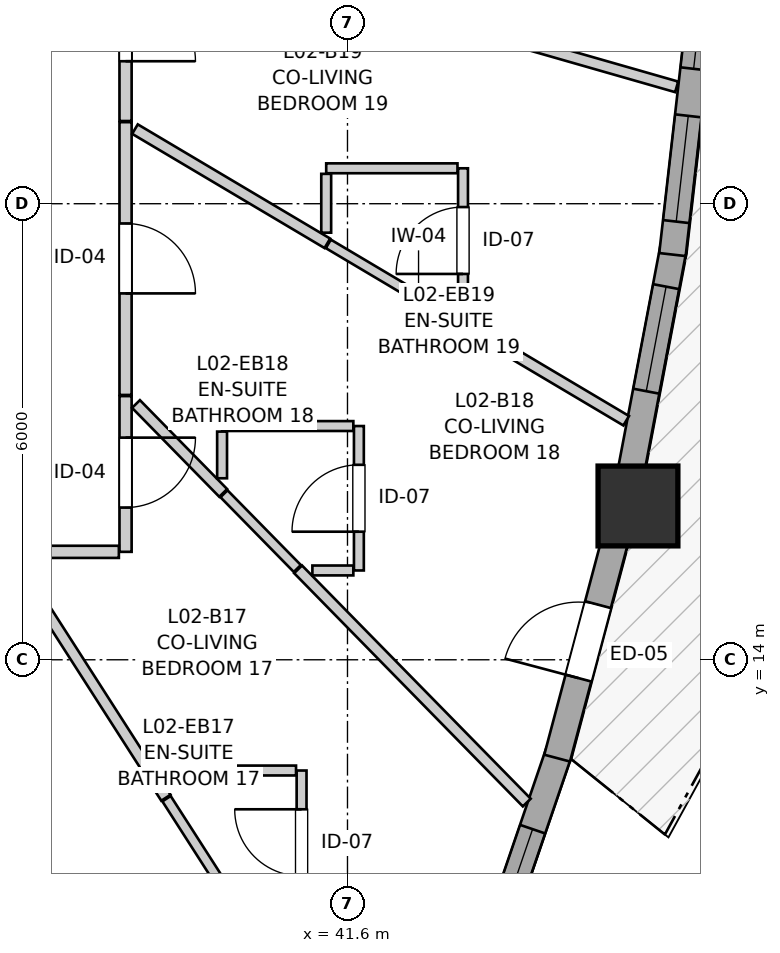
"""IFC4 building model, lengths in metres.
Left out: names, types, materials, properties, quantities, classifications, styles, units other than length and angle.
Written with IfcOpenShell. Run it as: python <this file> out.ifc"""

import sys

from ifc_helpers import new_model, si_unit, direction, frame, frame_2d, origin, origin_2d, place, context, subcontext, project, spatial, rectangle, extrude, source, transform, mapped, element, fill, save


model = new_model("IFC4")
c1 = context("Model", 3, precision=1e-05, world=origin(), true_north=direction((0.0, 1.0)))
c2 = subcontext(c1, "Body", "Model", "MODEL_VIEW")
j1 = project(units=[si_unit("LENGTHUNIT", "METRE"), si_unit("PLANEANGLEUNIT", "RADIAN")], contexts=[c1])
p1 = place(None, origin())
s1 = spatial("IfcSite", under=j1, at=p1, CompositionType="ELEMENT")
p2 = place(p1, origin())
s2 = spatial("IfcBuilding", under=s1, at=p2, CompositionType="ELEMENT")
p3 = place(p2, frame((0.0, 0.0, 11.0)))
s3 = spatial("IfcBuildingStorey", under=s2, at=p3, CompositionType="ELEMENT", Elevation=11.0)
m1 = source(origin(), c2, "Body", "SweptSolid", [
    extrude(rectangle(XDim=1.05, YDim=1.05, at=origin_2d()), origin(), (0.0, 0.0, 1.0), 2.94),
])
p4 = place(p3, frame((45.422, 16.023, 0.0), z_axis=(0.0, 0.0, 1.0), x_axis=(1.0, 0.0, 0.0)))
e1 = element("IfcColumn", 1, at=p4, inside=s3, PredefinedType="COLUMN", context=c2, shape_type="MappedRepresentation", body=[
    mapped(m1, transform((0.0, 0.0, 0.0), x_axis=(1.0, 0.0, 0.0), y_axis=(0.0, 1.0, 0.0), z_axis=(0.0, 0.0, 1.0), scale=1.0)),
])
p5 = place(p3, frame((43.241, 9.448, 0.0), z_axis=(0.0, 0.0, 1.0), x_axis=(0.323599751171, 0.946194060984, 0.0)))
e2 = element("IfcWall", 2, at=p5, inside=s3, PredefinedType="SOLIDWALL", context=c2, shape_type="SweptSolid", body=[
    extrude(rectangle(XDim=3.532, YDim=0.35, at=frame_2d((1.766, 0.0))), origin(), (0.0, 0.0, 1.0), 2.42),
])
p6 = place(p5, frame((0.356, 0.0, 0.82)))
e3 = element("IfcOpeningElement", 3, at=p6, cuts=e2, PredefinedType="OPENING", context=c2, shape_type="SweptSolid", body=[
    extrude(rectangle(XDim=2.1, YDim=1.4, at=frame_2d((1.05, 0.7))), frame((0.0, 0.185, 0.0), z_axis=(0.0, -1.0, 0.0), x_axis=(1.0, 0.0, 0.0)), (0.0, 0.0, 1.0), 0.37),
])
p7 = place(p3, frame((44.358, 12.706, 0.0), z_axis=(0.0, 0.0, 1.0), x_axis=(0.25708907847, 0.966387709841, 0.0)))
e4 = element("IfcWall", 4, at=p7, inside=s3, PredefinedType="SOLIDWALL", context=c2, shape_type="SweptSolid", body=[
    extrude(rectangle(XDim=3.179, YDim=0.35, at=frame_2d((1.59, 0.0))), origin(), (0.0, 0.0, 1.0), 2.42),
])
p8 = place(p7, frame((1.09, 0.0, 0.0)))
e5 = element("IfcOpeningElement", 5, at=p8, cuts=e4, PredefinedType="OPENING", context=c2, shape_type="SweptSolid", body=[
    extrude(rectangle(XDim=1.0, YDim=2.1, at=frame_2d((0.5, 1.05))), frame((0.0, 0.185, 0.0), z_axis=(0.0, -1.0, 0.0), x_axis=(1.0, 0.0, 0.0)), (0.0, 0.0, 1.0), 0.37),
])
p9 = place(p3, frame((45.306, 16.351, 0.0), z_axis=(0.0, 0.0, 1.0), x_axis=(0.186681017514, 0.982420580861, 0.0)))
e6 = element("IfcWall", 6, at=p9, inside=s3, PredefinedType="SOLIDWALL", context=c2, shape_type="SweptSolid", body=[
    extrude(rectangle(XDim=3.123, YDim=0.35, at=frame_2d((1.562, 0.0))), origin(), (0.0, 0.0, 1.0), 2.42),
])
p10 = place(p9, frame((1.204, 0.0, 0.82)))
e7 = element("IfcOpeningElement", 7, at=p10, cuts=e6, PredefinedType="OPENING", context=c2, shape_type="SweptSolid", body=[
    extrude(rectangle(XDim=1.4, YDim=1.35, at=frame_2d((0.7, 0.675))), frame((0.0, 0.185, 0.0), z_axis=(0.0, -1.0, 0.0), x_axis=(1.0, 0.0, 0.0)), (0.0, 0.0, 1.0), 0.37),
])
p11 = place(p3, frame((45.875, 19.331, 0.0), z_axis=(0.0, 0.0, 1.0), x_axis=(0.113329685842, 0.99355743785, 0.0)))
e8 = element("IfcWall", 8, at=p11, inside=s3, PredefinedType="SOLIDWALL", context=c2, shape_type="SweptSolid", body=[
    extrude(rectangle(XDim=3.365, YDim=0.35, at=frame_2d((1.683, 0.0))), origin(), (0.0, 0.0, 1.0), 2.42),
])
p12 = place(p11, frame((0.437, 0.0, 0.82)))
e9 = element("IfcOpeningElement", 9, at=p12, cuts=e8, PredefinedType="OPENING", context=c2, shape_type="SweptSolid", body=[
    extrude(rectangle(XDim=1.4, YDim=1.35, at=frame_2d((0.7, 0.675))), frame((0.0, 0.185, 0.0), z_axis=(0.0, -1.0, 0.0), x_axis=(1.0, 0.0, 0.0)), (0.0, 0.0, 1.0), 0.37),
])
p13 = place(p11, frame((2.459, 0.0, 0.82)))
e10 = element("IfcOpeningElement", 10, at=p13, cuts=e8, PredefinedType="OPENING", context=c2, shape_type="SweptSolid", body=[
    extrude(rectangle(XDim=0.58, YDim=1.35, at=frame_2d((0.29, 0.675))), frame((0.0, 0.185, 0.0), z_axis=(0.0, -1.0, 0.0), x_axis=(1.0, 0.0, 0.0)), (0.0, 0.0, 1.0), 0.37),
])
p14 = place(p3, frame((38.68, 21.073, 0.0), z_axis=(0.0, 0.0, 1.0), x_axis=(0.0, -1.0, 0.0)))
e11 = element("IfcWall", 11, at=p14, inside=s3, PredefinedType="PARTITIONING", context=c2, shape_type="SweptSolid", body=[
    extrude(rectangle(XDim=3.589, YDim=0.16, at=frame_2d((1.794, 0.0))), origin(), (0.0, 0.0, 1.0), 2.94),
])
p15 = place(p14, frame((1.333, 0.0, 0.0)))
e12 = element("IfcOpeningElement", 12, at=p15, cuts=e11, PredefinedType="OPENING", context=c2, shape_type="SweptSolid", body=[
    extrude(rectangle(XDim=0.92, YDim=2.1, at=frame_2d((0.46, 1.05))), frame((0.0, 0.09, 0.0), z_axis=(0.0, -1.0, 0.0), x_axis=(1.0, 0.0, 0.0)), (0.0, 0.0, 1.0), 0.18),
])
p16 = place(p3, frame((38.68, 23.63, 0.0), z_axis=(0.0, 0.0, 1.0), x_axis=(0.0, -1.0, 0.0)))
e13 = element("IfcWall", 13, at=p16, inside=s3, PredefinedType="PARTITIONING", context=c2, shape_type="SweptSolid", body=[
    extrude(rectangle(XDim=2.542, YDim=0.16, at=frame_2d((1.271, 0.0))), origin(), (0.0, 0.0, 1.0), 2.94),
])
p17 = place(p16, frame((0.835, 0.0, 0.0)))
e14 = element("IfcOpeningElement", 14, at=p17, cuts=e13, PredefinedType="OPENING", context=c2, shape_type="SweptSolid", body=[
    extrude(rectangle(XDim=0.92, YDim=2.1, at=frame_2d((0.46, 1.05))), frame((0.0, 0.09, 0.0), z_axis=(0.0, -1.0, 0.0), x_axis=(1.0, 0.0, 0.0)), (0.0, 0.0, 1.0), 0.18),
])
p18 = place(p3, frame((38.68, 17.469, 0.0), z_axis=(0.0, 0.0, 1.0), x_axis=(0.0, -1.0, 0.0)))
e15 = element("IfcWall", 15, at=p18, inside=s3, PredefinedType="PARTITIONING", context=c2, shape_type="SweptSolid", body=[
    extrude(rectangle(XDim=2.049, YDim=0.16, at=frame_2d((1.024, 0.0))), origin(), (0.0, 0.0, 1.0), 2.94),
])
p19 = place(p18, frame((0.546, 0.0, 0.0)))
e16 = element("IfcOpeningElement", 16, at=p19, cuts=e15, PredefinedType="OPENING", context=c2, shape_type="SweptSolid", body=[
    extrude(rectangle(XDim=0.92, YDim=2.1, at=frame_2d((0.46, 1.05))), frame((0.0, 0.09, 0.0), z_axis=(0.0, -1.0, 0.0), x_axis=(1.0, 0.0, 0.0)), (0.0, 0.0, 1.0), 0.18),
])
p20 = place(p3, frame((43.12, 18.566, 0.0), z_axis=(0.0, 0.0, 1.0), x_axis=(0.0, 1.0, 0.0)))
e17 = element("IfcWall", 17, at=p20, inside=s3, PredefinedType="PARTITIONING", context=c2, shape_type="SweptSolid", body=[
    extrude(rectangle(XDim=1.9, YDim=0.13, at=frame_2d((0.95, 0.0))), origin(), (0.0, 0.0, 1.0), 2.94),
])
p21 = place(p20, frame((0.51, 0.0, 0.0)))
e18 = element("IfcOpeningElement", 18, at=p21, cuts=e17, PredefinedType="OPENING", context=c2, shape_type="SweptSolid", body=[
    extrude(rectangle(XDim=0.88, YDim=2.05, at=frame_2d((0.44, 1.025))), frame((0.0, 0.075, 0.0), z_axis=(0.0, -1.0, 0.0), x_axis=(1.0, 0.0, 0.0)), (0.0, 0.0, 1.0), 0.15),
])
p22 = place(p3, frame((40.996, 10.643, 0.0), z_axis=(0.0, 0.0, 1.0), x_axis=(0.0, 1.0, 0.0)))
e19 = element("IfcWall", 19, at=p22, inside=s3, PredefinedType="PARTITIONING", context=c2, shape_type="SweptSolid", body=[
    extrude(rectangle(XDim=1.9, YDim=0.13, at=frame_2d((0.95, 0.0))), origin(), (0.0, 0.0, 1.0), 2.94),
])
p23 = place(p22, frame((0.51, 0.0, 0.0)))
e20 = element("IfcOpeningElement", 20, at=p23, cuts=e19, PredefinedType="OPENING", context=c2, shape_type="SweptSolid", body=[
    extrude(rectangle(XDim=0.88, YDim=2.05, at=frame_2d((0.44, 1.025))), frame((0.0, 0.075, 0.0), z_axis=(0.0, -1.0, 0.0), x_axis=(1.0, 0.0, 0.0)), (0.0, 0.0, 1.0), 0.15),
])
p24 = place(p3, frame((41.75, 15.175, 0.0), z_axis=(0.0, 0.0, 1.0), x_axis=(0.0, 1.0, 0.0)))
e21 = element("IfcWall", 21, at=p24, inside=s3, PredefinedType="PARTITIONING", context=c2, shape_type="SweptSolid", body=[
    extrude(rectangle(XDim=1.9, YDim=0.13, at=frame_2d((0.95, 0.0))), origin(), (0.0, 0.0, 1.0), 2.94),
])
p25 = place(p24, frame((0.51, 0.0, 0.0)))
e22 = element("IfcOpeningElement", 22, at=p25, cuts=e21, PredefinedType="OPENING", context=c2, shape_type="SweptSolid", body=[
    extrude(rectangle(XDim=0.88, YDim=2.05, at=frame_2d((0.44, 1.025))), frame((0.0, 0.075, 0.0), z_axis=(0.0, -1.0, 0.0), x_axis=(1.0, 0.0, 0.0)), (0.0, 0.0, 1.0), 0.15),
])
p26 = place(p3, frame((40.95, 15.19, 0.0), z_axis=(0.0, 0.0, 1.0), x_axis=(0.700142401903, -0.714003233226, 0.0)))
e23 = element("IfcWall", 23, at=p26, inside=s3, PredefinedType="PARTITIONING", context=c2, shape_type="SweptSolid", body=[
    extrude(rectangle(XDim=4.298, YDim=0.145, at=frame_2d((2.149, 0.0))), origin(), (0.0, 0.0, 1.0), 2.94),
])
p27 = place(p3, frame((37.217, 15.294, 0.0), z_axis=(0.0, 0.0, 1.0), x_axis=(0.539878709929, -0.841742822105, 0.0)))
e24 = element("IfcWall", 24, at=p27, inside=s3, PredefinedType="PARTITIONING", context=c2, shape_type="SweptSolid", body=[
    extrude(rectangle(XDim=3.694, YDim=0.145, at=frame_2d((1.847, 0.0))), origin(), (0.0, 0.0, 1.0), 2.94),
])
p28 = place(p3, frame((38.804, 20.981, 0.0), z_axis=(0.0, 0.0, 1.0), x_axis=(0.859905944731, -0.510452511225, 0.0)))
e25 = element("IfcWall", 25, at=p28, inside=s3, PredefinedType="PARTITIONING", context=c2, shape_type="SweptSolid", body=[
    extrude(rectangle(XDim=2.943, YDim=0.145, at=frame_2d((1.472, 0.0))), origin(), (0.0, 0.0, 1.0), 2.94),
])
p29 = place(p3, frame((43.055, 22.361, 0.0), z_axis=(0.0, 0.0, 1.0), x_axis=(0.961351316588, -0.275324619486, 0.0)))
e26 = element("IfcWall", 26, at=p29, inside=s3, PredefinedType="PARTITIONING", context=c2, shape_type="SweptSolid", body=[
    extrude(rectangle(XDim=2.992, YDim=0.145, at=frame_2d((1.496, 0.0))), origin(), (0.0, 0.0, 1.0), 2.94),
])
p30 = place(p3, frame((42.848, 18.581, 0.0), z_axis=(0.0, 0.0, 1.0), x_axis=(0.859872599939, -0.510508679528, 0.0)))
e27 = element("IfcWall", 27, at=p30, inside=s3, PredefinedType="PARTITIONING", context=c2, shape_type="SweptSolid", body=[
    extrude(rectangle(XDim=2.813, YDim=0.145, at=frame_2d((1.407, 0.0))), origin(), (0.0, 0.0, 1.0), 2.94),
])
p31 = place(p3, frame((38.817, 17.365, 0.0), z_axis=(0.0, 0.0, 1.0), x_axis=(0.70029627305, -0.713852316626, 0.0)))
e28 = element("IfcWall", 28, at=p31, inside=s3, PredefinedType="PARTITIONING", context=c2, shape_type="SweptSolid", body=[
    extrude(rectangle(XDim=1.639, YDim=0.145, at=frame_2d((0.819, 0.0))), origin(), (0.0, 0.0, 1.0), 2.94),
])
for number, where, z_axis, x_axis in (
    (29, (39.196, 12.543, 0.0), (0.0, 0.0, 1.0), (1.0, 0.0, 0.0)),
    (30, (39.95, 17.075, 0.0), (0.0, 0.0, 1.0), (1.0, 0.0, 0.0)),
    (31, (41.32, 20.466, 0.0), (0.0, 0.0, 1.0), (1.0, 0.0, 0.0)),
):
    element("IfcWall", number, at=place(p3, frame(where, z_axis=z_axis, x_axis=x_axis)), inside=s3, PredefinedType="PARTITIONING", context=c2, shape_type="SweptSolid", body=[
        extrude(rectangle(XDim=1.727, YDim=0.13, at=frame_2d((0.864, 0.0))), origin(), (0.0, 0.0, 1.0), 2.94),
    ])
p32 = place(p3, frame((39.219, 12.172, 0.0), z_axis=(0.0, 0.0, 1.0), x_axis=(0.539899826285, -0.84172927808, 0.0)))
e32 = element("IfcWall", 32, at=p32, inside=s3, PredefinedType="PARTITIONING", context=c2, shape_type="SweptSolid", body=[
    extrude(rectangle(XDim=1.784, YDim=0.13, at=frame_2d((0.892, 0.0))), origin(), (0.0, 0.0, 1.0), 2.94),
])
p33 = place(p3, frame((41.348, 19.471, 0.0), z_axis=(0.0, 0.0, 1.0), x_axis=(0.859825694404, -0.510587676352, 0.0)))
e33 = element("IfcWall", 33, at=p33, inside=s3, PredefinedType="PARTITIONING", context=c2, shape_type="SweptSolid", body=[
    extrude(rectangle(XDim=1.729, YDim=0.13, at=frame_2d((0.865, 0.0))), origin(), (0.0, 0.0, 1.0), 2.94),
])
p34 = place(p3, frame((37.314, 15.42, 0.0), z_axis=(0.0, 0.0, 1.0), x_axis=(1.0, 0.0, 0.0)))
e34 = element("IfcWall", 34, at=p34, inside=s3, PredefinedType="PARTITIONING", context=c2, shape_type="SweptSolid", body=[
    extrude(rectangle(XDim=1.278, YDim=0.16, at=frame_2d((0.639, 0.0))), origin(), (0.0, 0.0, 1.0), 2.94),
])
p35 = place(p3, frame((39.975, 16.184, 0.0), z_axis=(0.0, 0.0, 1.0), x_axis=(0.700338966049, -0.713810431861, 0.0)))
e35 = element("IfcWall", 35, at=p35, inside=s3, PredefinedType="PARTITIONING", context=c2, shape_type="SweptSolid", body=[
    extrude(rectangle(XDim=1.377, YDim=0.13, at=frame_2d((0.689, 0.0))), origin(), (0.0, 0.0, 1.0), 2.94),
])
p36 = place(p3, frame((41.32, 19.619, 0.0), z_axis=(0.0, 0.0, 1.0), x_axis=(0.0, 1.0, 0.0)))
e36 = element("IfcWall", 36, at=p36, inside=s3, PredefinedType="PARTITIONING", context=c2, shape_type="SweptSolid", body=[
    extrude(rectangle(XDim=0.774, YDim=0.13, at=frame_2d((0.387, 0.0))), origin(), (0.0, 0.0, 1.0), 2.94),
])
p37 = place(p3, frame((39.95, 16.388, 0.0), z_axis=(0.0, 0.0, 1.0), x_axis=(0.0, 1.0, 0.0)))
e37 = element("IfcWall", 37, at=p37, inside=s3, PredefinedType="PARTITIONING", context=c2, shape_type="SweptSolid", body=[
    extrude(rectangle(XDim=0.614, YDim=0.13, at=frame_2d((0.307, 0.0))), origin(), (0.0, 0.0, 1.0), 2.94),
])
p38 = place(p3, frame((41.138, 15.175, 0.0), z_axis=(0.0, 0.0, 1.0), x_axis=(1.0, 0.0, 0.0)))
e38 = element("IfcWall", 38, at=p38, inside=s3, PredefinedType="PARTITIONING", context=c2, shape_type="SweptSolid", body=[
    extrude(rectangle(XDim=0.539, YDim=0.13, at=frame_2d((0.27, 0.0))), origin(), (0.0, 0.0, 1.0), 2.94),
])
m2 = source(origin(), c2, "Body", "SweptSolid", [
    extrude(rectangle(XDim=2.1, YDim=1.4, at=frame_2d((1.05, 0.7))), frame((0.0, 0.03, 0.0), z_axis=(0.0, -1.0, 0.0), x_axis=(1.0, 0.0, 0.0)), (0.0, 0.0, 1.0), 0.06),
])
p39 = place(p6, origin())
e39 = element("IfcWindow", 39, at=p39, inside=s3, PartitioningType="SINGLE_PANEL", PredefinedType="WINDOW", context=c2, shape_type="MappedRepresentation", body=[
    mapped(m2, transform((0.0, 0.0, 0.0), x_axis=(1.0, 0.0, 0.0), y_axis=(0.0, 1.0, 0.0), z_axis=(0.0, 0.0, 1.0), scale=1.0)),
])
fill(e3, e39)
m3 = source(origin(), c2, "Body", "SweptSolid", [
    extrude(rectangle(XDim=1.4, YDim=1.35, at=frame_2d((0.7, 0.675))), frame((0.0, 0.03, 0.0), z_axis=(0.0, -1.0, 0.0), x_axis=(1.0, 0.0, 0.0)), (0.0, 0.0, 1.0), 0.06),
])
p40 = place(p10, origin())
e40 = element("IfcWindow", 40, at=p40, inside=s3, PartitioningType="SINGLE_PANEL", PredefinedType="WINDOW", context=c2, shape_type="MappedRepresentation", body=[
    mapped(m3, transform((0.0, 0.0, 0.0), x_axis=(1.0, 0.0, 0.0), y_axis=(0.0, 1.0, 0.0), z_axis=(0.0, 0.0, 1.0), scale=1.0)),
])
fill(e7, e40)
p41 = place(p12, origin())
e41 = element("IfcWindow", 41, at=p41, inside=s3, PartitioningType="SINGLE_PANEL", PredefinedType="WINDOW", context=c2, shape_type="MappedRepresentation", body=[
    mapped(m3, transform((0.0, 0.0, 0.0), x_axis=(1.0, 0.0, 0.0), y_axis=(0.0, 1.0, 0.0), z_axis=(0.0, 0.0, 1.0), scale=1.0)),
])
fill(e9, e41)
m4 = source(origin(), c2, "Body", "SweptSolid", [
    extrude(rectangle(XDim=0.58, YDim=1.35, at=frame_2d((0.29, 0.675))), frame((0.0, 0.03, 0.0), z_axis=(0.0, -1.0, 0.0), x_axis=(1.0, 0.0, 0.0)), (0.0, 0.0, 1.0), 0.06),
])
p42 = place(p13, origin())
e42 = element("IfcWindow", 42, at=p42, inside=s3, PartitioningType="SINGLE_PANEL", PredefinedType="WINDOW", context=c2, shape_type="MappedRepresentation", body=[
    mapped(m4, transform((0.0, 0.0, 0.0), x_axis=(1.0, 0.0, 0.0), y_axis=(0.0, 1.0, 0.0), z_axis=(0.0, 0.0, 1.0), scale=1.0)),
])
fill(e10, e42)
m5 = source(origin(), c2, "Body", "SweptSolid", [
    extrude(rectangle(XDim=1.0, YDim=2.1, at=frame_2d((0.5, 1.05))), frame((0.0, 0.025, 0.0), z_axis=(0.0, -1.0, 0.0), x_axis=(1.0, 0.0, 0.0)), (0.0, 0.0, 1.0), 0.05),
])
p43 = place(p8, origin())
e43 = element("IfcDoor", 43, at=p43, inside=s3, OperationType="SINGLE_SWING_LEFT", PredefinedType="DOOR", context=c2, shape_type="MappedRepresentation", body=[
    mapped(m5, transform((0.0, 0.0, 0.0), x_axis=(1.0, 0.0, 0.0), y_axis=(0.0, 1.0, 0.0), z_axis=(0.0, 0.0, 1.0), scale=1.0)),
])
fill(e5, e43)
m6 = source(origin(), c2, "Body", "SweptSolid", [
    extrude(rectangle(XDim=0.92, YDim=2.1, at=frame_2d((0.46, 1.05))), frame((0.0, 0.025, 0.0), z_axis=(0.0, -1.0, 0.0), x_axis=(1.0, 0.0, 0.0)), (0.0, 0.0, 1.0), 0.05),
])
p44 = place(p15, origin())
e44 = element("IfcDoor", 44, at=p44, inside=s3, OperationType="SINGLE_SWING_RIGHT", PredefinedType="DOOR", context=c2, shape_type="MappedRepresentation", body=[
    mapped(m6, transform((0.0, 0.0, 0.0), x_axis=(1.0, 0.0, 0.0), y_axis=(0.0, 1.0, 0.0), z_axis=(0.0, 0.0, 1.0), scale=1.0)),
])
fill(e12, e44)
p45 = place(p17, origin())
e45 = element("IfcDoor", 45, at=p45, inside=s3, OperationType="SINGLE_SWING_RIGHT", PredefinedType="DOOR", context=c2, shape_type="MappedRepresentation", body=[
    mapped(m6, transform((0.0, 0.0, 0.0), x_axis=(1.0, 0.0, 0.0), y_axis=(0.0, 1.0, 0.0), z_axis=(0.0, 0.0, 1.0), scale=1.0)),
])
fill(e14, e45)
p46 = place(p19, origin())
e46 = element("IfcDoor", 46, at=p46, inside=s3, OperationType="SINGLE_SWING_LEFT", PredefinedType="DOOR", context=c2, shape_type="MappedRepresentation", body=[
    mapped(m6, transform((0.0, 0.0, 0.0), x_axis=(1.0, 0.0, 0.0), y_axis=(0.0, 1.0, 0.0), z_axis=(0.0, 0.0, 1.0), scale=1.0)),
])
fill(e16, e46)
m7 = source(origin(), c2, "Body", "SweptSolid", [
    extrude(rectangle(XDim=0.88, YDim=2.05, at=frame_2d((0.44, 1.025))), frame((0.0, 0.025, 0.0), z_axis=(0.0, -1.0, 0.0), x_axis=(1.0, 0.0, 0.0)), (0.0, 0.0, 1.0), 0.05),
])
p47 = place(p21, origin())
e47 = element("IfcDoor", 47, at=p47, inside=s3, OperationType="SINGLE_SWING_LEFT", PredefinedType="DOOR", context=c2, shape_type="MappedRepresentation", body=[
    mapped(m7, transform((0.0, 0.0, 0.0), x_axis=(1.0, 0.0, 0.0), y_axis=(0.0, 1.0, 0.0), z_axis=(0.0, 0.0, 1.0), scale=1.0)),
])
fill(e18, e47)
p48 = place(p23, origin())
e48 = element("IfcDoor", 48, at=p48, inside=s3, OperationType="SINGLE_SWING_RIGHT", PredefinedType="DOOR", context=c2, shape_type="MappedRepresentation", body=[
    mapped(m7, transform((0.0, 0.0, 0.0), x_axis=(1.0, 0.0, 0.0), y_axis=(0.0, 1.0, 0.0), z_axis=(0.0, 0.0, 1.0), scale=1.0)),
])
fill(e20, e48)
p49 = place(p25, origin())
e49 = element("IfcDoor", 49, at=p49, inside=s3, OperationType="SINGLE_SWING_LEFT", PredefinedType="DOOR", context=c2, shape_type="MappedRepresentation", body=[
    mapped(m7, transform((0.0, 0.0, 0.0), x_axis=(1.0, 0.0, 0.0), y_axis=(0.0, 1.0, 0.0), z_axis=(0.0, 0.0, 1.0), scale=1.0)),
])
fill(e22, e49)
save(model, sys.argv[1])
